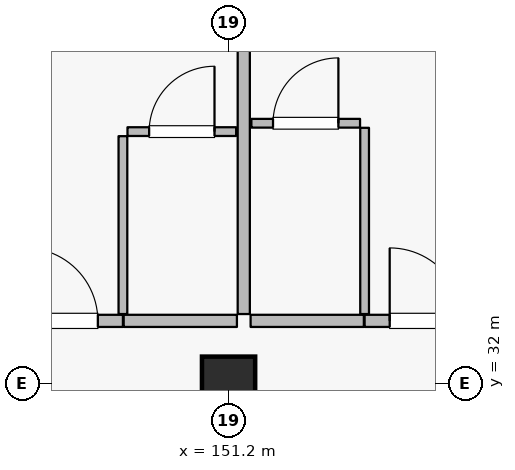
"""IFC4 building model, lengths in metres.
Left out: names, types, materials, properties, quantities, classifications, styles, units other than length and angle.
Written with IfcOpenShell. Run it as: python <this file> out.ifc"""

import sys

from ifc_helpers import new_model, si_unit, direction, frame, frame_2d, origin, origin_2d, place, context, subcontext, project, spatial, rectangle, extrude, element, fill, save


model = new_model("IFC4")
c1 = context("Model", 3, precision=1e-05, world=origin(), true_north=direction((0.0, 1.0)))
c2 = subcontext(c1, "Body", "Model", "MODEL_VIEW")
j1 = project(units=[si_unit("LENGTHUNIT", "METRE"), si_unit("PLANEANGLEUNIT", "RADIAN")], contexts=[c1])
p1 = place(None, origin())
s1 = spatial("IfcSite", under=j1, at=p1, CompositionType="ELEMENT")
p2 = place(p1, origin())
s2 = spatial("IfcBuilding", under=s1, at=p2, CompositionType="ELEMENT")
p3 = place(p2, frame((0.0, 0.0, 28.8)))
s3 = spatial("IfcBuildingStorey", under=s2, at=p3, CompositionType="ELEMENT", Elevation=28.8)
p4 = place(p3, frame((151.2, 32.0, 0.0), z_axis=(0.0, 0.0, 1.0), x_axis=(1.0, 0.0, 0.0)))
e1 = element("IfcColumn", 1, at=p4, inside=s3, PredefinedType="COLUMN", context=c2, shape_type="SweptSolid", body=[
    extrude(rectangle(XDim=0.7, YDim=0.7, at=origin_2d()), origin(), (0.0, 0.0, 1.0), 3.6),
])
p5 = place(p3, frame((143.15, 32.333, 0.0), z_axis=(0.0, 0.0, 1.0), x_axis=(0.724116091282, 0.689678103427, 0.0)))
e2 = element("IfcWall", 2, at=p5, inside=s3, PredefinedType="SOLIDWALL", context=c2, shape_type="SweptSolid", body=[
    extrude(rectangle(XDim=10.634, YDim=0.24, at=frame_2d((5.317, 0.0))), origin(), (0.0, 0.0, 1.0), 2.93),
])
p6 = place(p5, frame((0.27, 0.0, 0.8)))
e3 = element("IfcOpeningElement", 3, at=p6, cuts=e2, PredefinedType="OPENING", context=c2, shape_type="SweptSolid", body=[
    extrude(rectangle(XDim=1.6, YDim=1.6, at=frame_2d((0.8, 0.8))), frame((0.0, 0.13, 0.0), z_axis=(0.0, -1.0, 0.0), x_axis=(1.0, 0.0, 0.0)), (0.0, 0.0, 1.0), 0.26),
])
p7 = place(p5, frame((3.757, 0.0, 0.8)))
e4 = element("IfcOpeningElement", 4, at=p7, cuts=e2, PredefinedType="OPENING", context=c2, shape_type="SweptSolid", body=[
    extrude(rectangle(XDim=1.6, YDim=1.6, at=frame_2d((0.8, 0.8))), frame((0.0, 0.13, 0.0), z_axis=(0.0, -1.0, 0.0), x_axis=(1.0, 0.0, 0.0)), (0.0, 0.0, 1.0), 0.26),
])
p8 = place(p5, frame((8.004, 0.0, 0.8)))
e5 = element("IfcOpeningElement", 5, at=p8, cuts=e2, PredefinedType="OPENING", context=c2, shape_type="SweptSolid", body=[
    extrude(rectangle(XDim=1.6, YDim=1.6, at=frame_2d((0.8, 0.8))), frame((0.0, 0.13, 0.0), z_axis=(0.0, -1.0, 0.0), x_axis=(1.0, 0.0, 0.0)), (0.0, 0.0, 1.0), 0.26),
])
p9 = place(p3, frame((148.19, 32.82, 0.0), z_axis=(0.0, 0.0, 1.0), x_axis=(1.0, 0.0, 0.0)))
e6 = element("IfcWall", 6, at=p9, inside=s3, PredefinedType="PARTITIONING", context=c2, shape_type="SweptSolid", body=[
    extrude(rectangle(XDim=1.62, YDim=0.16, at=frame_2d((0.81, 0.0))), origin(), (0.0, 0.0, 1.0), 3.365),
])
p10 = place(p9, frame((0.33, 0.0, 0.0)))
e7 = element("IfcOpeningElement", 7, at=p10, cuts=e6, PredefinedType="OPENING", context=c2, shape_type="SweptSolid", body=[
    extrude(rectangle(XDim=0.96, YDim=2.2, at=frame_2d((0.48, 1.1))), frame((0.0, 0.09, 0.0), z_axis=(0.0, -1.0, 0.0), x_axis=(1.0, 0.0, 0.0)), (0.0, 0.0, 1.0), 0.18),
])
p11 = place(p3, frame((149.82, 32.82, 0.0), z_axis=(0.0, 0.0, 1.0), x_axis=(1.0, 0.0, 0.0)))
e8 = element("IfcWall", 8, at=p11, inside=s3, PredefinedType="PARTITIONING", context=c2, shape_type="SweptSolid", body=[
    extrude(rectangle(XDim=1.49, YDim=0.16, at=frame_2d((0.745, 0.0))), origin(), (0.0, 0.0, 1.0), 3.365),
])
p12 = place(p3, frame((149.81, 32.91, 0.0), z_axis=(0.0, 0.0, 1.0), x_axis=(0.0, 1.0, 0.0)))
e9 = element("IfcWall", 9, at=p12, inside=s3, PredefinedType="PARTITIONING", context=c2, shape_type="SweptSolid", body=[
    extrude(rectangle(XDim=2.34, YDim=0.115, at=frame_2d((1.17, 0.0))), origin(), (0.0, 0.0, 1.0), 3.365),
])
p13 = place(p3, frame((149.87, 35.31, 0.0), z_axis=(0.0, 0.0, 1.0), x_axis=(1.0, 0.0, 0.0)))
e10 = element("IfcWall", 10, at=p13, inside=s3, PredefinedType="PARTITIONING", context=c2, shape_type="SweptSolid", body=[
    extrude(rectangle(XDim=1.43, YDim=0.115, at=frame_2d((0.715, 0.0))), origin(), (0.0, 0.0, 1.0), 3.365),
])
p14 = place(p13, frame((0.285, 0.0, 0.0)))
e11 = element("IfcOpeningElement", 11, at=p14, cuts=e10, PredefinedType="OPENING", context=c2, shape_type="SweptSolid", body=[
    extrude(rectangle(XDim=0.86, YDim=2.12, at=frame_2d((0.43, 1.06))), frame((0.0, 0.067, 0.0), z_axis=(0.0, -1.0, 0.0), x_axis=(1.0, 0.0, 0.0)), (0.0, 0.0, 1.0), 0.135),
])
p15 = place(p3, frame((151.49, 32.82, 0.0), z_axis=(0.0, 0.0, 1.0), x_axis=(1.0, 0.0, 0.0)))
e12 = element("IfcWall", 12, at=p15, inside=s3, PredefinedType="PARTITIONING", context=c2, shape_type="SweptSolid", body=[
    extrude(rectangle(XDim=1.49, YDim=0.16, at=frame_2d((0.745, 0.0))), origin(), (0.0, 0.0, 1.0), 3.365),
])
p16 = place(p3, frame((152.99, 32.82, 0.0), z_axis=(0.0, 0.0, 1.0), x_axis=(1.0, 0.0, 0.0)))
e13 = element("IfcWall", 13, at=p16, inside=s3, PredefinedType="PARTITIONING", context=c2, shape_type="SweptSolid", body=[
    extrude(rectangle(XDim=1.62, YDim=0.16, at=frame_2d((0.81, 0.0))), origin(), (0.0, 0.0, 1.0), 3.365),
])
p17 = place(p16, frame((0.33, 0.0, 0.0)))
e14 = element("IfcOpeningElement", 14, at=p17, cuts=e13, PredefinedType="OPENING", context=c2, shape_type="SweptSolid", body=[
    extrude(rectangle(XDim=0.96, YDim=2.2, at=frame_2d((0.48, 1.1))), frame((0.0, 0.09, 0.0), z_axis=(0.0, -1.0, 0.0), x_axis=(1.0, 0.0, 0.0)), (0.0, 0.0, 1.0), 0.18),
])
p18 = place(p3, frame((152.99, 32.91, 0.0), z_axis=(0.0, 0.0, 1.0), x_axis=(0.0, 1.0, 0.0)))
e15 = element("IfcWall", 15, at=p18, inside=s3, PredefinedType="PARTITIONING", context=c2, shape_type="SweptSolid", body=[
    extrude(rectangle(XDim=2.45, YDim=0.115, at=frame_2d((1.225, 0.0))), origin(), (0.0, 0.0, 1.0), 3.365),
])
p19 = place(p3, frame((151.5, 35.42, 0.0), z_axis=(0.0, 0.0, 1.0), x_axis=(1.0, 0.0, 0.0)))
e16 = element("IfcWall", 16, at=p19, inside=s3, PredefinedType="PARTITIONING", context=c2, shape_type="SweptSolid", body=[
    extrude(rectangle(XDim=1.43, YDim=0.115, at=frame_2d((0.715, 0.0))), origin(), (0.0, 0.0, 1.0), 3.365),
])
p20 = place(p19, frame((0.285, 0.0, 0.0)))
e17 = element("IfcOpeningElement", 17, at=p20, cuts=e16, PredefinedType="OPENING", context=c2, shape_type="SweptSolid", body=[
    extrude(rectangle(XDim=0.86, YDim=2.12, at=frame_2d((0.43, 1.06))), frame((0.0, 0.067, 0.0), z_axis=(0.0, -1.0, 0.0), x_axis=(1.0, 0.0, 0.0)), (0.0, 0.0, 1.0), 0.135),
])
p21 = place(p3, frame((151.4, 32.91, 0.0), z_axis=(0.0, 0.0, 1.0), x_axis=(0.0, 1.0, 0.0)))
e18 = element("IfcWall", 18, at=p21, inside=s3, PredefinedType="PARTITIONING", context=c2, shape_type="SweptSolid", body=[
    extrude(rectangle(XDim=6.75, YDim=0.16, at=frame_2d((3.375, 0.0))), origin(), (0.0, 0.0, 1.0), 2.73),
])
p22 = place(p10, origin())
e19 = element("IfcDoor", 19, at=p22, inside=s3, OperationType="SINGLE_SWING_LEFT", PredefinedType="DOOR", context=c2, shape_type="SweptSolid", body=[
    extrude(rectangle(XDim=0.96, YDim=2.2, at=frame_2d((0.48, 1.1))), frame((0.0, 0.025, 0.0), z_axis=(0.0, -1.0, 0.0), x_axis=(1.0, 0.0, 0.0)), (0.0, 0.0, 1.0), 0.05),
])
fill(e7, e19)
p23 = place(p14, origin())
e20 = element("IfcDoor", 20, at=p23, inside=s3, OperationType="SINGLE_SWING_RIGHT", PredefinedType="DOOR", context=c2, shape_type="SweptSolid", body=[
    extrude(rectangle(XDim=0.86, YDim=2.12, at=frame_2d((0.43, 1.06))), frame((0.0, 0.025, 0.0), z_axis=(0.0, -1.0, 0.0), x_axis=(1.0, 0.0, 0.0)), (0.0, 0.0, 1.0), 0.05),
])
fill(e11, e20)
p24 = place(p17, origin())
e21 = element("IfcDoor", 21, at=p24, inside=s3, OperationType="SINGLE_SWING_LEFT", PredefinedType="DOOR", context=c2, shape_type="SweptSolid", body=[
    extrude(rectangle(XDim=0.96, YDim=2.2, at=frame_2d((0.48, 1.1))), frame((0.0, 0.025, 0.0), z_axis=(0.0, -1.0, 0.0), x_axis=(1.0, 0.0, 0.0)), (0.0, 0.0, 1.0), 0.05),
])
fill(e14, e21)
p25 = place(p20, origin())
e22 = element("IfcDoor", 22, at=p25, inside=s3, OperationType="SINGLE_SWING_RIGHT", PredefinedType="DOOR", context=c2, shape_type="SweptSolid", body=[
    extrude(rectangle(XDim=0.86, YDim=2.12, at=frame_2d((0.43, 1.06))), frame((0.0, 0.025, 0.0), z_axis=(0.0, -1.0, 0.0), x_axis=(1.0, 0.0, 0.0)), (0.0, 0.0, 1.0), 0.05),
])
fill(e17, e22)
save(model, sys.argv[1])
